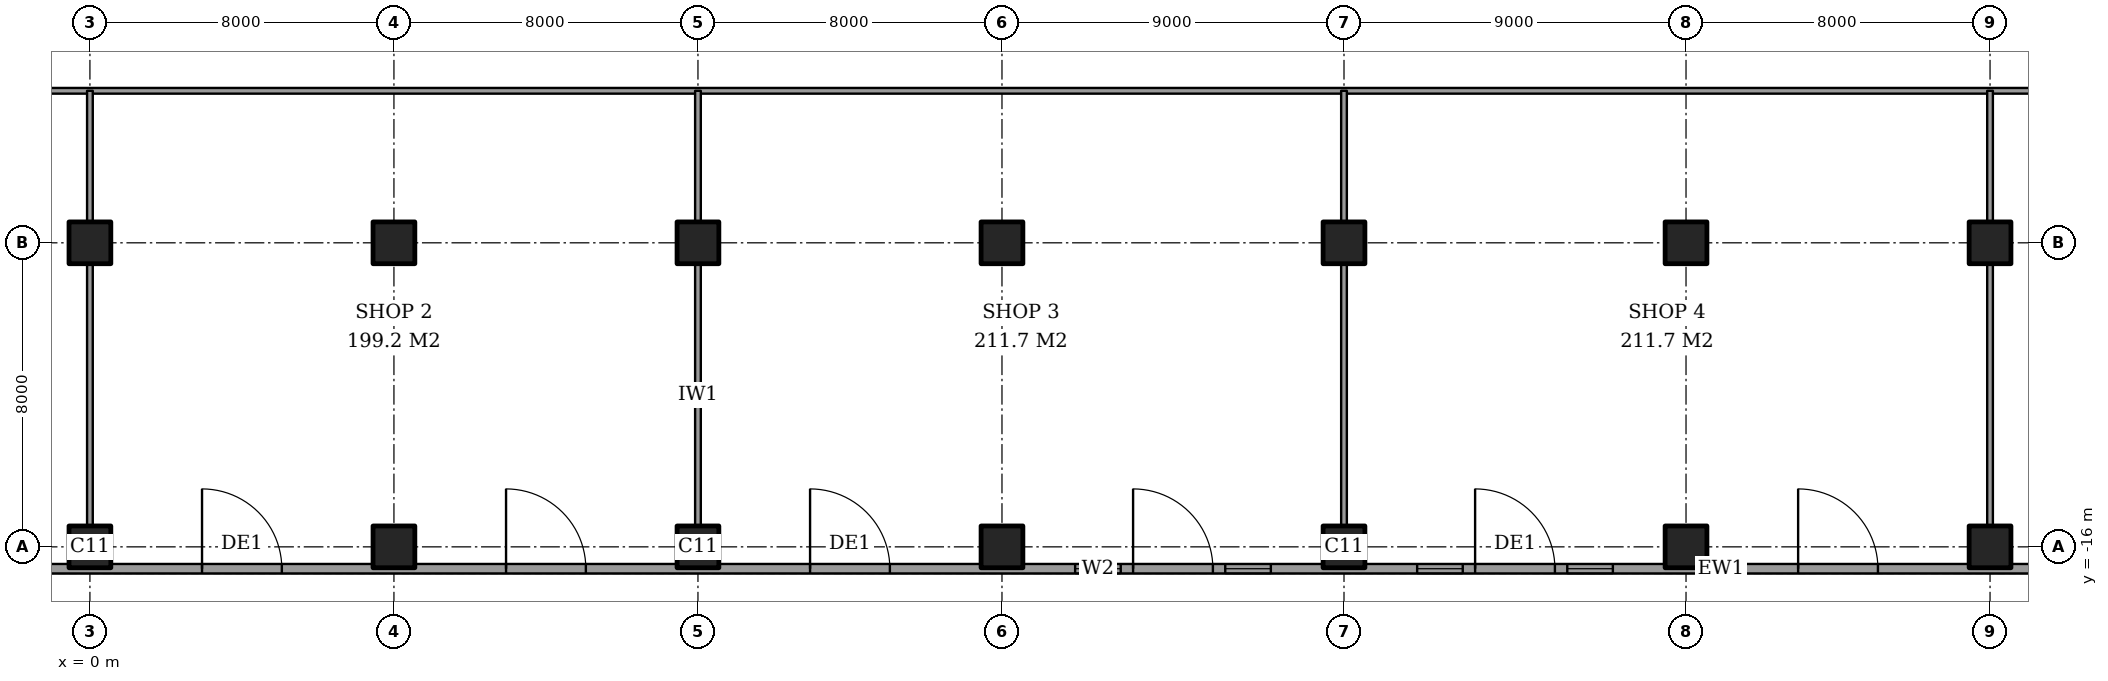
"""IFC4 building model, lengths in metres.
Left out: names, types, materials, properties, quantities, classifications, styles, units other than length and angle.
Written with IfcOpenShell. Run it as: python <this file> out.ifc"""

import sys

from ifc_helpers import new_model, si_unit, direction, frame, frame_2d, origin, origin_2d, place, context, subcontext, project, spatial, rectangle, extrude, element, fill, save


model = new_model("IFC4")
c1 = context("Model", 3, precision=1e-05, world=origin(), true_north=direction((0.0, 1.0)))
c2 = subcontext(c1, "Body", "Model", "MODEL_VIEW")
j1 = project(units=[si_unit("LENGTHUNIT", "METRE"), si_unit("PLANEANGLEUNIT", "RADIAN")], contexts=[c1])
p1 = place(None, origin())
s1 = spatial("IfcSite", under=j1, at=p1, CompositionType="ELEMENT")
p2 = place(p1, origin())
s2 = spatial("IfcBuilding", under=s1, at=p2, CompositionType="ELEMENT")
p3 = place(p2, origin())
s3 = spatial("IfcBuildingStorey", under=s2, at=p3, CompositionType="ELEMENT", Elevation=0.0)
for number, where, z_axis, x_axis in (
    (1, (0.0, -16.0, 0.0), (0.0, 0.0, 1.0), (1.0, 0.0, 0.0)),
    (2, (0.0, -8.0, 0.0), (0.0, 0.0, 1.0), (1.0, 0.0, 0.0)),
    (3, (8.0, -16.0, 0.0), (0.0, 0.0, 1.0), (1.0, 0.0, 0.0)),
    (4, (8.0, -8.0, 0.0), (0.0, 0.0, 1.0), (1.0, 0.0, 0.0)),
    (5, (16.0, -16.0, 0.0), (0.0, 0.0, 1.0), (1.0, 0.0, 0.0)),
    (6, (16.0, -8.0, 0.0), (0.0, 0.0, 1.0), (1.0, 0.0, 0.0)),
    (7, (24.0, -16.0, 0.0), (0.0, 0.0, 1.0), (1.0, 0.0, 0.0)),
    (8, (24.0, -8.0, 0.0), (0.0, 0.0, 1.0), (1.0, 0.0, 0.0)),
    (9, (33.0, -16.0, 0.0), (0.0, 0.0, 1.0), (1.0, 0.0, 0.0)),
    (10, (33.0, -8.0, 0.0), (0.0, 0.0, 1.0), (1.0, 0.0, 0.0)),
    (11, (42.0, -16.0, 0.0), (0.0, 0.0, 1.0), (1.0, 0.0, 0.0)),
    (12, (42.0, -8.0, 0.0), (0.0, 0.0, 1.0), (1.0, 0.0, 0.0)),
    (13, (50.0, -16.0, 0.0), (0.0, 0.0, 1.0), (1.0, 0.0, 0.0)),
    (14, (50.0, -8.0, 0.0), (0.0, 0.0, 1.0), (1.0, 0.0, 0.0)),
):
    element("IfcColumn", number, at=place(p3, frame(where, z_axis=z_axis, x_axis=x_axis)), inside=s3, PredefinedType="COLUMN", context=c2, shape_type="SweptSolid", body=[
        extrude(rectangle(XDim=1.1, YDim=1.1, at=origin_2d()), origin(), (0.0, 0.0, 1.0), 6.0),
    ])
p4 = place(p3, frame((-16.575, -16.575, 0.0), z_axis=(0.0, 0.0, 1.0), x_axis=(1.0, 0.0, 0.0)))
e15 = element("IfcWall", 15, at=p4, inside=s3, PredefinedType="SOLIDWALL", context=c2, shape_type="SweptSolid", body=[
    extrude(rectangle(XDim=99.15, YDim=0.25, at=frame_2d((49.575, 0.0))), origin(), (0.0, 0.0, 1.0), 6.0),
])
p5 = place(p4, frame((3.525, 0.0, 0.0)))
e16 = element("IfcOpeningElement", 16, at=p5, cuts=e15, PredefinedType="OPENING", context=c2, shape_type="SweptSolid", body=[
    extrude(rectangle(XDim=2.1, YDim=2.4, at=frame_2d((1.05, 1.2))), frame((0.0, 0.135, 0.0), z_axis=(0.0, -1.0, 0.0), x_axis=(1.0, 0.0, 0.0)), (0.0, 0.0, 1.0), 0.27),
])
p6 = place(p4, frame((11.525, 0.0, 0.0)))
e17 = element("IfcOpeningElement", 17, at=p6, cuts=e15, PredefinedType="OPENING", context=c2, shape_type="SweptSolid", body=[
    extrude(rectangle(XDim=2.1, YDim=2.4, at=frame_2d((1.05, 1.2))), frame((0.0, 0.135, 0.0), z_axis=(0.0, -1.0, 0.0), x_axis=(1.0, 0.0, 0.0)), (0.0, 0.0, 1.0), 0.27),
])
p7 = place(p4, frame((19.525, 0.0, 0.0)))
e18 = element("IfcOpeningElement", 18, at=p7, cuts=e15, PredefinedType="OPENING", context=c2, shape_type="SweptSolid", body=[
    extrude(rectangle(XDim=2.1, YDim=2.4, at=frame_2d((1.05, 1.2))), frame((0.0, 0.135, 0.0), z_axis=(0.0, -1.0, 0.0), x_axis=(1.0, 0.0, 0.0)), (0.0, 0.0, 1.0), 0.27),
])
p8 = place(p4, frame((27.525, 0.0, 0.0)))
e19 = element("IfcOpeningElement", 19, at=p8, cuts=e15, PredefinedType="OPENING", context=c2, shape_type="SweptSolid", body=[
    extrude(rectangle(XDim=2.1, YDim=2.4, at=frame_2d((1.05, 1.2))), frame((0.0, 0.135, 0.0), z_axis=(0.0, -1.0, 0.0), x_axis=(1.0, 0.0, 0.0)), (0.0, 0.0, 1.0), 0.27),
])
p9 = place(p4, frame((35.525, 0.0, 0.0)))
e20 = element("IfcOpeningElement", 20, at=p9, cuts=e15, PredefinedType="OPENING", context=c2, shape_type="SweptSolid", body=[
    extrude(rectangle(XDim=2.1, YDim=2.4, at=frame_2d((1.05, 1.2))), frame((0.0, 0.135, 0.0), z_axis=(0.0, -1.0, 0.0), x_axis=(1.0, 0.0, 0.0)), (0.0, 0.0, 1.0), 0.27),
])
p10 = place(p4, frame((44.025, 0.0, 0.0)))
e21 = element("IfcOpeningElement", 21, at=p10, cuts=e15, PredefinedType="OPENING", context=c2, shape_type="SweptSolid", body=[
    extrude(rectangle(XDim=2.1, YDim=2.4, at=frame_2d((1.05, 1.2))), frame((0.0, 0.135, 0.0), z_axis=(0.0, -1.0, 0.0), x_axis=(1.0, 0.0, 0.0)), (0.0, 0.0, 1.0), 0.27),
])
p11 = place(p4, frame((42.5, 0.0, 0.3)))
e22 = element("IfcOpeningElement", 22, at=p11, cuts=e15, PredefinedType="OPENING", context=c2, shape_type="SweptSolid", body=[
    extrude(rectangle(XDim=1.2, YDim=3.6, at=frame_2d((0.6, 1.8))), frame((0.0, 0.135, 0.0), z_axis=(0.0, -1.0, 0.0), x_axis=(1.0, 0.0, 0.0)), (0.0, 0.0, 1.0), 0.27),
])
p12 = place(p4, frame((46.45, 0.0, 0.3)))
e23 = element("IfcOpeningElement", 23, at=p12, cuts=e15, PredefinedType="OPENING", context=c2, shape_type="SweptSolid", body=[
    extrude(rectangle(XDim=1.2, YDim=3.6, at=frame_2d((0.6, 1.8))), frame((0.0, 0.135, 0.0), z_axis=(0.0, -1.0, 0.0), x_axis=(1.0, 0.0, 0.0)), (0.0, 0.0, 1.0), 0.27),
])
p13 = place(p4, frame((53.025, 0.0, 0.0)))
e24 = element("IfcOpeningElement", 24, at=p13, cuts=e15, PredefinedType="OPENING", context=c2, shape_type="SweptSolid", body=[
    extrude(rectangle(XDim=2.1, YDim=2.4, at=frame_2d((1.05, 1.2))), frame((0.0, 0.135, 0.0), z_axis=(0.0, -1.0, 0.0), x_axis=(1.0, 0.0, 0.0)), (0.0, 0.0, 1.0), 0.27),
])
p14 = place(p4, frame((61.525, 0.0, 0.0)))
e25 = element("IfcOpeningElement", 25, at=p14, cuts=e15, PredefinedType="OPENING", context=c2, shape_type="SweptSolid", body=[
    extrude(rectangle(XDim=2.1, YDim=2.4, at=frame_2d((1.05, 1.2))), frame((0.0, 0.135, 0.0), z_axis=(0.0, -1.0, 0.0), x_axis=(1.0, 0.0, 0.0)), (0.0, 0.0, 1.0), 0.27),
])
p15 = place(p4, frame((51.5, 0.0, 0.3)))
e26 = element("IfcOpeningElement", 26, at=p15, cuts=e15, PredefinedType="OPENING", context=c2, shape_type="SweptSolid", body=[
    extrude(rectangle(XDim=1.2, YDim=3.6, at=frame_2d((0.6, 1.8))), frame((0.0, 0.135, 0.0), z_axis=(0.0, -1.0, 0.0), x_axis=(1.0, 0.0, 0.0)), (0.0, 0.0, 1.0), 0.27),
])
p16 = place(p4, frame((55.45, 0.0, 0.3)))
e27 = element("IfcOpeningElement", 27, at=p16, cuts=e15, PredefinedType="OPENING", context=c2, shape_type="SweptSolid", body=[
    extrude(rectangle(XDim=1.2, YDim=3.6, at=frame_2d((0.6, 1.8))), frame((0.0, 0.135, 0.0), z_axis=(0.0, -1.0, 0.0), x_axis=(1.0, 0.0, 0.0)), (0.0, 0.0, 1.0), 0.27),
])
p17 = place(p4, frame((69.525, 0.0, 0.0)))
e28 = element("IfcOpeningElement", 28, at=p17, cuts=e15, PredefinedType="OPENING", context=c2, shape_type="SweptSolid", body=[
    extrude(rectangle(XDim=2.1, YDim=2.4, at=frame_2d((1.05, 1.2))), frame((0.0, 0.135, 0.0), z_axis=(0.0, -1.0, 0.0), x_axis=(1.0, 0.0, 0.0)), (0.0, 0.0, 1.0), 0.27),
])
p18 = place(p4, frame((77.525, 0.0, 0.0)))
e29 = element("IfcOpeningElement", 29, at=p18, cuts=e15, PredefinedType="OPENING", context=c2, shape_type="SweptSolid", body=[
    extrude(rectangle(XDim=2.1, YDim=2.4, at=frame_2d((1.05, 1.2))), frame((0.0, 0.135, 0.0), z_axis=(0.0, -1.0, 0.0), x_axis=(1.0, 0.0, 0.0)), (0.0, 0.0, 1.0), 0.27),
])
p19 = place(p4, frame((85.525, 0.0, 0.0)))
e30 = element("IfcOpeningElement", 30, at=p19, cuts=e15, PredefinedType="OPENING", context=c2, shape_type="SweptSolid", body=[
    extrude(rectangle(XDim=2.1, YDim=2.4, at=frame_2d((1.05, 1.2))), frame((0.0, 0.135, 0.0), z_axis=(0.0, -1.0, 0.0), x_axis=(1.0, 0.0, 0.0)), (0.0, 0.0, 1.0), 0.27),
])
p20 = place(p4, frame((93.525, 0.0, 0.0)))
e31 = element("IfcOpeningElement", 31, at=p20, cuts=e15, PredefinedType="OPENING", context=c2, shape_type="SweptSolid", body=[
    extrude(rectangle(XDim=2.1, YDim=2.4, at=frame_2d((1.05, 1.2))), frame((0.0, 0.135, 0.0), z_axis=(0.0, -1.0, 0.0), x_axis=(1.0, 0.0, 0.0)), (0.0, 0.0, 1.0), 0.27),
])
p21 = place(p3, frame((-16.45, -4.0, 0.0), z_axis=(0.0, 0.0, 1.0), x_axis=(1.0, 0.0, 0.0)))
e32 = element("IfcWall", 32, at=p21, inside=s3, PredefinedType="PARTITIONING", context=c2, shape_type="SweptSolid", body=[
    extrude(rectangle(XDim=84.75, YDim=0.15, at=frame_2d((42.375, 0.0))), origin(), (0.0, 0.0, 1.0), 5.7),
])
p22 = place(p3, frame((0.0, -15.45, 0.0), z_axis=(0.0, 0.0, 1.0), x_axis=(0.0, 1.0, 0.0)))
e33 = element("IfcWall", 33, at=p22, inside=s3, PredefinedType="PARTITIONING", context=c2, shape_type="SweptSolid", body=[
    extrude(rectangle(XDim=6.9, YDim=0.15, at=frame_2d((3.45, 0.0))), origin(), (0.0, 0.0, 1.0), 4.3),
])
p23 = place(p3, frame((0.0, -7.45, 0.0), z_axis=(0.0, 0.0, 1.0), x_axis=(0.0, 1.0, 0.0)))
e34 = element("IfcWall", 34, at=p23, inside=s3, PredefinedType="PARTITIONING", context=c2, shape_type="SweptSolid", body=[
    extrude(rectangle(XDim=3.45, YDim=0.15, at=frame_2d((1.725, 0.0))), origin(), (0.0, 0.0, 1.0), 4.3),
])
p24 = place(p3, frame((16.0, -15.45, 0.0), z_axis=(0.0, 0.0, 1.0), x_axis=(0.0, 1.0, 0.0)))
e35 = element("IfcWall", 35, at=p24, inside=s3, PredefinedType="PARTITIONING", context=c2, shape_type="SweptSolid", body=[
    extrude(rectangle(XDim=6.9, YDim=0.15, at=frame_2d((3.45, 0.0))), origin(), (0.0, 0.0, 1.0), 4.3),
])
p25 = place(p3, frame((16.0, -7.45, 0.0), z_axis=(0.0, 0.0, 1.0), x_axis=(0.0, 1.0, 0.0)))
e36 = element("IfcWall", 36, at=p25, inside=s3, PredefinedType="PARTITIONING", context=c2, shape_type="SweptSolid", body=[
    extrude(rectangle(XDim=3.45, YDim=0.15, at=frame_2d((1.725, 0.0))), origin(), (0.0, 0.0, 1.0), 4.3),
])
p26 = place(p3, frame((33.0, -15.45, 0.0), z_axis=(0.0, 0.0, 1.0), x_axis=(0.0, 1.0, 0.0)))
e37 = element("IfcWall", 37, at=p26, inside=s3, PredefinedType="PARTITIONING", context=c2, shape_type="SweptSolid", body=[
    extrude(rectangle(XDim=6.9, YDim=0.15, at=frame_2d((3.45, 0.0))), origin(), (0.0, 0.0, 1.0), 4.3),
])
p27 = place(p3, frame((33.0, -7.45, 0.0), z_axis=(0.0, 0.0, 1.0), x_axis=(0.0, 1.0, 0.0)))
e38 = element("IfcWall", 38, at=p27, inside=s3, PredefinedType="PARTITIONING", context=c2, shape_type="SweptSolid", body=[
    extrude(rectangle(XDim=3.45, YDim=0.15, at=frame_2d((1.725, 0.0))), origin(), (0.0, 0.0, 1.0), 4.3),
])
p28 = place(p3, frame((50.0, -15.45, 0.0), z_axis=(0.0, 0.0, 1.0), x_axis=(0.0, 1.0, 0.0)))
e39 = element("IfcWall", 39, at=p28, inside=s3, PredefinedType="PARTITIONING", context=c2, shape_type="SweptSolid", body=[
    extrude(rectangle(XDim=6.9, YDim=0.15, at=frame_2d((3.45, 0.0))), origin(), (0.0, 0.0, 1.0), 4.3),
])
p29 = place(p3, frame((50.0, -7.45, 0.0), z_axis=(0.0, 0.0, 1.0), x_axis=(0.0, 1.0, 0.0)))
e40 = element("IfcWall", 40, at=p29, inside=s3, PredefinedType="PARTITIONING", context=c2, shape_type="SweptSolid", body=[
    extrude(rectangle(XDim=3.45, YDim=0.15, at=frame_2d((1.725, 0.0))), origin(), (0.0, 0.0, 1.0), 4.3),
])
p30 = place(p7, origin())
e41 = element("IfcDoor", 41, at=p30, inside=s3, OperationType="DOUBLE_DOOR_DOUBLE_SWING", PredefinedType="DOOR", context=c2, shape_type="SweptSolid", body=[
    extrude(rectangle(XDim=2.1, YDim=2.4, at=frame_2d((1.05, 1.2))), frame((0.0, 0.025, 0.0), z_axis=(0.0, -1.0, 0.0), x_axis=(1.0, 0.0, 0.0)), (0.0, 0.0, 1.0), 0.05),
])
fill(e18, e41)
p31 = place(p8, origin())
e42 = element("IfcDoor", 42, at=p31, inside=s3, OperationType="DOUBLE_DOOR_DOUBLE_SWING", PredefinedType="DOOR", context=c2, shape_type="SweptSolid", body=[
    extrude(rectangle(XDim=2.1, YDim=2.4, at=frame_2d((1.05, 1.2))), frame((0.0, 0.025, 0.0), z_axis=(0.0, -1.0, 0.0), x_axis=(1.0, 0.0, 0.0)), (0.0, 0.0, 1.0), 0.05),
])
fill(e19, e42)
p32 = place(p9, origin())
e43 = element("IfcDoor", 43, at=p32, inside=s3, OperationType="DOUBLE_DOOR_DOUBLE_SWING", PredefinedType="DOOR", context=c2, shape_type="SweptSolid", body=[
    extrude(rectangle(XDim=2.1, YDim=2.4, at=frame_2d((1.05, 1.2))), frame((0.0, 0.025, 0.0), z_axis=(0.0, -1.0, 0.0), x_axis=(1.0, 0.0, 0.0)), (0.0, 0.0, 1.0), 0.05),
])
fill(e20, e43)
p33 = place(p10, origin())
e44 = element("IfcDoor", 44, at=p33, inside=s3, OperationType="DOUBLE_DOOR_DOUBLE_SWING", PredefinedType="DOOR", context=c2, shape_type="SweptSolid", body=[
    extrude(rectangle(XDim=2.1, YDim=2.4, at=frame_2d((1.05, 1.2))), frame((0.0, 0.025, 0.0), z_axis=(0.0, -1.0, 0.0), x_axis=(1.0, 0.0, 0.0)), (0.0, 0.0, 1.0), 0.05),
])
fill(e21, e44)
p34 = place(p11, origin())
e45 = element("IfcWindow", 45, at=p34, inside=s3, PartitioningType="SINGLE_PANEL", PredefinedType="WINDOW", context=c2, shape_type="SweptSolid", body=[
    extrude(rectangle(XDim=1.2, YDim=3.6, at=frame_2d((0.6, 1.8))), frame((0.0, 0.03, 0.0), z_axis=(0.0, -1.0, 0.0), x_axis=(1.0, 0.0, 0.0)), (0.0, 0.0, 1.0), 0.06),
])
fill(e22, e45)
p35 = place(p12, origin())
e46 = element("IfcWindow", 46, at=p35, inside=s3, PartitioningType="SINGLE_PANEL", PredefinedType="WINDOW", context=c2, shape_type="SweptSolid", body=[
    extrude(rectangle(XDim=1.2, YDim=3.6, at=frame_2d((0.6, 1.8))), frame((0.0, 0.03, 0.0), z_axis=(0.0, -1.0, 0.0), x_axis=(1.0, 0.0, 0.0)), (0.0, 0.0, 1.0), 0.06),
])
fill(e23, e46)
p36 = place(p13, origin())
e47 = element("IfcDoor", 47, at=p36, inside=s3, OperationType="DOUBLE_DOOR_DOUBLE_SWING", PredefinedType="DOOR", context=c2, shape_type="SweptSolid", body=[
    extrude(rectangle(XDim=2.1, YDim=2.4, at=frame_2d((1.05, 1.2))), frame((0.0, 0.025, 0.0), z_axis=(0.0, -1.0, 0.0), x_axis=(1.0, 0.0, 0.0)), (0.0, 0.0, 1.0), 0.05),
])
fill(e24, e47)
p37 = place(p14, origin())
e48 = element("IfcDoor", 48, at=p37, inside=s3, OperationType="DOUBLE_DOOR_DOUBLE_SWING", PredefinedType="DOOR", context=c2, shape_type="SweptSolid", body=[
    extrude(rectangle(XDim=2.1, YDim=2.4, at=frame_2d((1.05, 1.2))), frame((0.0, 0.025, 0.0), z_axis=(0.0, -1.0, 0.0), x_axis=(1.0, 0.0, 0.0)), (0.0, 0.0, 1.0), 0.05),
])
fill(e25, e48)
p38 = place(p15, origin())
e49 = element("IfcWindow", 49, at=p38, inside=s3, PartitioningType="SINGLE_PANEL", PredefinedType="WINDOW", context=c2, shape_type="SweptSolid", body=[
    extrude(rectangle(XDim=1.2, YDim=3.6, at=frame_2d((0.6, 1.8))), frame((0.0, 0.03, 0.0), z_axis=(0.0, -1.0, 0.0), x_axis=(1.0, 0.0, 0.0)), (0.0, 0.0, 1.0), 0.06),
])
fill(e26, e49)
p39 = place(p16, origin())
e50 = element("IfcWindow", 50, at=p39, inside=s3, PartitioningType="SINGLE_PANEL", PredefinedType="WINDOW", context=c2, shape_type="SweptSolid", body=[
    extrude(rectangle(XDim=1.2, YDim=3.6, at=frame_2d((0.6, 1.8))), frame((0.0, 0.03, 0.0), z_axis=(0.0, -1.0, 0.0), x_axis=(1.0, 0.0, 0.0)), (0.0, 0.0, 1.0), 0.06),
])
fill(e27, e50)
save(model, sys.argv[1])
